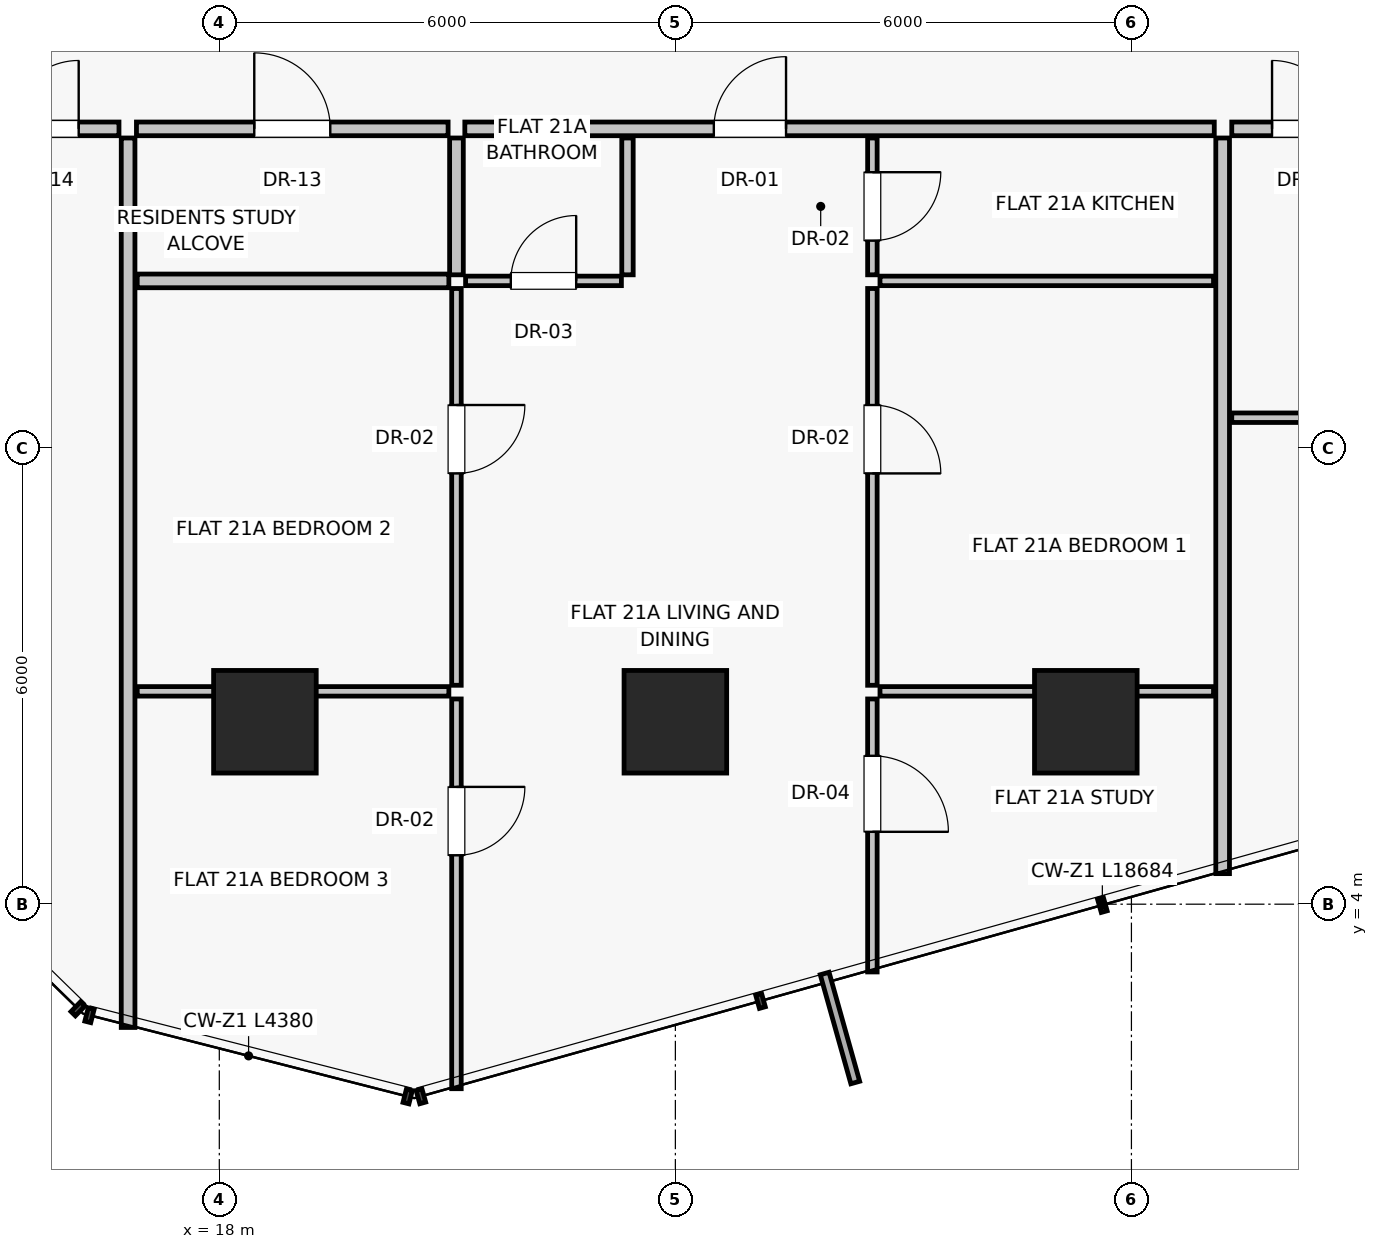
"""IFC4 building model, lengths in metres.
Left out: names, types, materials, properties, quantities, classifications, styles, units other than length and angle.
Written with IfcOpenShell. Run it as: python <this file> out.ifc"""

import sys

from ifc_helpers import new_model, si_unit, direction, frame, frame_2d, origin, origin_2d, place, context, subcontext, project, spatial, rectangle, extrude, source, transform, mapped, element, fill, save


model = new_model("IFC4")
c1 = context("Model", 3, precision=1e-05, world=origin(), true_north=direction((0.0, 1.0)))
c2 = subcontext(c1, "Body", "Model", "MODEL_VIEW")
j1 = project(units=[si_unit("LENGTHUNIT", "METRE"), si_unit("PLANEANGLEUNIT", "RADIAN")], contexts=[c1])
p1 = place(None, origin())
s1 = spatial("IfcSite", under=j1, at=p1, CompositionType="ELEMENT")
p2 = place(p1, origin())
s2 = spatial("IfcBuilding", under=s1, at=p2, CompositionType="ELEMENT")
p3 = place(p2, frame((0.0, 0.0, 77.1)))
s3 = spatial("IfcBuildingStorey", under=s2, at=p3, CompositionType="ELEMENT", Elevation=77.1)
for number, where, z_axis, x_axis in (
    (1, (18.6, 6.4, 0.0), (0.0, 0.0, 1.0), (1.0, 0.0, 0.0)),
    (2, (24.0, 6.4, 0.0), (0.0, 0.0, 1.0), (1.0, 0.0, 0.0)),
    (3, (29.4, 6.4, 0.0), (0.0, 0.0, 1.0), (1.0, 0.0, 0.0)),
):
    element("IfcColumn", number, at=place(p3, frame(where, z_axis=z_axis, x_axis=x_axis)), inside=s3, PredefinedType="COLUMN", context=c2, shape_type="SweptSolid", body=[
        extrude(rectangle(XDim=1.35, YDim=1.35, at=origin_2d()), origin(), (0.0, 0.0, 1.0), 3.25),
    ])
p4 = place(p3, frame((16.8, 14.08, 0.0), z_axis=(0.0, 0.0, 1.0), x_axis=(0.0, -1.0, 0.0)))
e4 = element("IfcWall", 4, at=p4, inside=s3, PredefinedType="PARTITIONING", context=c2, shape_type="SweptSolid", body=[
    extrude(rectangle(XDim=11.702, YDim=0.18, at=frame_2d((5.851, 0.0))), origin(), (0.0, 0.0, 1.0), 2.93),
])
p5 = place(p3, frame((31.2, 14.08, 0.0), z_axis=(0.0, 0.0, 1.0), x_axis=(0.0, -1.0, 0.0)))
e5 = element("IfcWall", 5, at=p5, inside=s3, PredefinedType="PARTITIONING", context=c2, shape_type="SweptSolid", body=[
    extrude(rectangle(XDim=9.678, YDim=0.18, at=frame_2d((4.839, 0.0))), origin(), (0.0, 0.0, 1.0), 2.93),
])
p6 = place(p3, frame((16.91, 14.2, 0.0), z_axis=(0.0, 0.0, 1.0), x_axis=(1.0, 0.0, 0.0)))
e6 = element("IfcWall", 6, at=p6, inside=s3, PredefinedType="PARTITIONING", context=c2, shape_type="SweptSolid", body=[
    extrude(rectangle(XDim=4.1, YDim=0.18, at=frame_2d((2.05, 0.0))), origin(), (0.0, 0.0, 1.0), 2.93),
])
p7 = place(p6, frame((1.55, 0.0, 0.0)))
e7 = element("IfcOpeningElement", 7, at=p7, cuts=e6, PredefinedType="OPENING", context=c2, shape_type="SweptSolid", body=[
    extrude(rectangle(XDim=1.0, YDim=2.01, at=frame_2d((0.5, 1.005))), frame((0.0, 0.1, 0.0), z_axis=(0.0, -1.0, 0.0), x_axis=(1.0, 0.0, 0.0)), (0.0, 0.0, 1.0), 0.2),
])
p8 = place(p3, frame((21.23, 14.2, 0.0), z_axis=(0.0, 0.0, 1.0), x_axis=(1.0, 0.0, 0.0)))
e8 = element("IfcWall", 8, at=p8, inside=s3, PredefinedType="PARTITIONING", context=c2, shape_type="SweptSolid", body=[
    extrude(rectangle(XDim=9.86, YDim=0.18, at=frame_2d((4.93, 0.0))), origin(), (0.0, 0.0, 1.0), 2.93),
])
p9 = place(p8, frame((3.276, 0.0, 0.0)))
e9 = element("IfcOpeningElement", 9, at=p9, cuts=e8, PredefinedType="OPENING", context=c2, shape_type="SweptSolid", body=[
    extrude(rectangle(XDim=0.95, YDim=2.02, at=frame_2d((0.475, 1.01))), frame((0.0, 0.1, 0.0), z_axis=(0.0, -1.0, 0.0), x_axis=(1.0, 0.0, 0.0)), (0.0, 0.0, 1.0), 0.2),
])
p10 = place(p3, frame((16.92, 6.8, 0.0), z_axis=(0.0, 0.0, 1.0), x_axis=(1.0, 0.0, 0.0)))
e10 = element("IfcWall", 10, at=p10, inside=s3, PredefinedType="PARTITIONING", context=c2, shape_type="SweptSolid", body=[
    extrude(rectangle(XDim=4.1, YDim=0.125, at=frame_2d((2.05, 0.0))), origin(), (0.0, 0.0, 1.0), 2.08),
])
p11 = place(p3, frame((21.12, 6.7, 0.0), z_axis=(0.0, 0.0, 1.0), x_axis=(0.0, -1.0, 0.0)))
e11 = element("IfcWall", 11, at=p11, inside=s3, PredefinedType="PARTITIONING", context=c2, shape_type="SweptSolid", body=[
    extrude(rectangle(XDim=5.127, YDim=0.125, at=frame_2d((2.564, 0.0))), origin(), (0.0, 0.0, 1.0), 2.93),
])
p12 = place(p11, frame((1.157, 0.0, 0.0)))
e12 = element("IfcOpeningElement", 12, at=p12, cuts=e11, PredefinedType="OPENING", context=c2, shape_type="SweptSolid", body=[
    extrude(rectangle(XDim=0.9, YDim=2.01, at=frame_2d((0.45, 1.005))), frame((0.0, 0.073, 0.0), z_axis=(0.0, -1.0, 0.0), x_axis=(1.0, 0.0, 0.0)), (0.0, 0.0, 1.0), 0.145),
])
p13 = place(p3, frame((26.692, 6.8, 0.0), z_axis=(0.0, 0.0, 1.0), x_axis=(1.0, 0.0, 0.0)))
e13 = element("IfcWall", 13, at=p13, inside=s3, PredefinedType="PARTITIONING", context=c2, shape_type="SweptSolid", body=[
    extrude(rectangle(XDim=4.388, YDim=0.125, at=frame_2d((2.194, 0.0))), origin(), (0.0, 0.0, 1.0), 2.08),
])
p14 = place(p3, frame((26.592, 6.7, 0.0), z_axis=(0.0, 0.0, 1.0), x_axis=(0.0, -1.0, 0.0)))
e14 = element("IfcWall", 14, at=p14, inside=s3, PredefinedType="PARTITIONING", context=c2, shape_type="SweptSolid", body=[
    extrude(rectangle(XDim=3.592, YDim=0.125, at=frame_2d((1.796, 0.0))), origin(), (0.0, 0.0, 1.0), 2.93),
])
p15 = place(p14, frame((0.748, 0.0, 0.0)))
e15 = element("IfcOpeningElement", 15, at=p15, cuts=e14, PredefinedType="OPENING", context=c2, shape_type="SweptSolid", body=[
    extrude(rectangle(XDim=1.0, YDim=2.01, at=frame_2d((0.5, 1.005))), frame((0.0, 0.073, 0.0), z_axis=(0.0, -1.0, 0.0), x_axis=(1.0, 0.0, 0.0)), (0.0, 0.0, 1.0), 0.145),
])
p16 = place(p3, frame((16.92, 12.2, 0.0), z_axis=(0.0, 0.0, 1.0), x_axis=(1.0, 0.0, 0.0)))
e16 = element("IfcWall", 16, at=p16, inside=s3, PredefinedType="PARTITIONING", context=c2, shape_type="SweptSolid", body=[
    extrude(rectangle(XDim=4.1, YDim=0.18, at=frame_2d((2.05, 0.0))), origin(), (0.0, 0.0, 1.0), 2.93),
])
p17 = place(p3, frame((21.12, 14.08, 0.0), z_axis=(0.0, 0.0, 1.0), x_axis=(0.0, -1.0, 0.0)))
e17 = element("IfcWall", 17, at=p17, inside=s3, PredefinedType="PARTITIONING", context=c2, shape_type="SweptSolid", body=[
    extrude(rectangle(XDim=1.8, YDim=0.18, at=frame_2d((0.9, 0.0))), origin(), (0.0, 0.0, 1.0), 2.93),
])
p18 = place(p3, frame((21.12, 12.1, 0.0), z_axis=(0.0, 0.0, 1.0), x_axis=(0.0, -1.0, 0.0)))
e18 = element("IfcWall", 18, at=p18, inside=s3, PredefinedType="PARTITIONING", context=c2, shape_type="SweptSolid", body=[
    extrude(rectangle(XDim=5.22, YDim=0.125, at=frame_2d((2.61, 0.0))), origin(), (0.0, 0.0, 1.0), 2.93),
])
p19 = place(p18, frame((1.533, 0.0, 0.0)))
e19 = element("IfcOpeningElement", 19, at=p19, cuts=e18, PredefinedType="OPENING", context=c2, shape_type="SweptSolid", body=[
    extrude(rectangle(XDim=0.9, YDim=2.01, at=frame_2d((0.45, 1.005))), frame((0.0, 0.073, 0.0), z_axis=(0.0, -1.0, 0.0), x_axis=(1.0, 0.0, 0.0)), (0.0, 0.0, 1.0), 0.145),
])
p20 = place(p3, frame((23.37, 14.08, 0.0), z_axis=(0.0, 0.0, 1.0), x_axis=(0.0, -1.0, 0.0)))
e20 = element("IfcWall", 20, at=p20, inside=s3, PredefinedType="PARTITIONING", context=c2, shape_type="SweptSolid", body=[
    extrude(rectangle(XDim=1.8, YDim=0.15, at=frame_2d((0.9, 0.0))), origin(), (0.0, 0.0, 1.0), 2.93),
])
p21 = place(p3, frame((21.24, 12.2, 0.0), z_axis=(0.0, 0.0, 1.0), x_axis=(1.0, 0.0, 0.0)))
e21 = element("IfcWall", 21, at=p21, inside=s3, PredefinedType="PARTITIONING", context=c2, shape_type="SweptSolid", body=[
    extrude(rectangle(XDim=2.05, YDim=0.125, at=frame_2d((1.025, 0.0))), origin(), (0.0, 0.0, 1.0), 2.93),
])
p22 = place(p21, frame((0.595, 0.0, 0.0)))
e22 = element("IfcOpeningElement", 22, at=p22, cuts=e21, PredefinedType="OPENING", context=c2, shape_type="SweptSolid", body=[
    extrude(rectangle(XDim=0.86, YDim=2.01, at=frame_2d((0.43, 1.005))), frame((0.0, 0.073, 0.0), z_axis=(0.0, -1.0, 0.0), x_axis=(1.0, 0.0, 0.0)), (0.0, 0.0, 1.0), 0.145),
])
p23 = place(p3, frame((26.592, 14.08, 0.0), z_axis=(0.0, 0.0, 1.0), x_axis=(0.0, -1.0, 0.0)))
e23 = element("IfcWall", 23, at=p23, inside=s3, PredefinedType="PARTITIONING", context=c2, shape_type="SweptSolid", body=[
    extrude(rectangle(XDim=1.8, YDim=0.125, at=frame_2d((0.9, 0.0))), origin(), (0.0, 0.0, 1.0), 2.93),
])
p24 = place(p23, frame((0.45, 0.0, 0.0)))
e24 = element("IfcOpeningElement", 24, at=p24, cuts=e23, PredefinedType="OPENING", context=c2, shape_type="SweptSolid", body=[
    extrude(rectangle(XDim=0.9, YDim=2.01, at=frame_2d((0.45, 1.005))), frame((0.0, 0.073, 0.0), z_axis=(0.0, -1.0, 0.0), x_axis=(1.0, 0.0, 0.0)), (0.0, 0.0, 1.0), 0.145),
])
p25 = place(p3, frame((26.692, 12.2, 0.0), z_axis=(0.0, 0.0, 1.0), x_axis=(1.0, 0.0, 0.0)))
e25 = element("IfcWall", 25, at=p25, inside=s3, PredefinedType="PARTITIONING", context=c2, shape_type="SweptSolid", body=[
    extrude(rectangle(XDim=4.388, YDim=0.125, at=frame_2d((2.194, 0.0))), origin(), (0.0, 0.0, 1.0), 2.93),
])
p26 = place(p3, frame((26.592, 12.1, 0.0), z_axis=(0.0, 0.0, 1.0), x_axis=(0.0, -1.0, 0.0)))
e26 = element("IfcWall", 26, at=p26, inside=s3, PredefinedType="PARTITIONING", context=c2, shape_type="SweptSolid", body=[
    extrude(rectangle(XDim=5.22, YDim=0.125, at=frame_2d((2.61, 0.0))), origin(), (0.0, 0.0, 1.0), 2.93),
])
p27 = place(p26, frame((1.533, 0.0, 0.0)))
e27 = element("IfcOpeningElement", 27, at=p27, cuts=e26, PredefinedType="OPENING", context=c2, shape_type="SweptSolid", body=[
    extrude(rectangle(XDim=0.9, YDim=2.01, at=frame_2d((0.45, 1.005))), frame((0.0, 0.073, 0.0), z_axis=(0.0, -1.0, 0.0), x_axis=(1.0, 0.0, 0.0)), (0.0, 0.0, 1.0), 0.145),
])
p28 = place(p3, frame((14.72, 14.2, 0.0), z_axis=(0.0, 0.0, 1.0), x_axis=(1.0, 0.0, 0.0)))
e28 = element("IfcWall", 28, at=p28, inside=s3, PredefinedType="PARTITIONING", context=c2, shape_type="SweptSolid", body=[
    extrude(rectangle(XDim=1.96, YDim=0.18, at=frame_2d((0.98, 0.0))), origin(), (0.0, 0.0, 1.0), 2.93),
])
p29 = place(p28, frame((0.53, 0.0, 0.0)))
e29 = element("IfcOpeningElement", 29, at=p29, cuts=e28, PredefinedType="OPENING", context=c2, shape_type="SweptSolid", body=[
    extrude(rectangle(XDim=0.9, YDim=2.01, at=frame_2d((0.45, 1.005))), frame((0.0, 0.1, 0.0), z_axis=(0.0, -1.0, 0.0), x_axis=(1.0, 0.0, 0.0)), (0.0, 0.0, 1.0), 0.2),
])
p30 = place(p3, frame((31.32, 14.2, 0.0), z_axis=(0.0, 0.0, 1.0), x_axis=(1.0, 0.0, 0.0)))
e30 = element("IfcWall", 30, at=p30, inside=s3, PredefinedType="PARTITIONING", context=c2, shape_type="SweptSolid", body=[
    extrude(rectangle(XDim=1.96, YDim=0.18, at=frame_2d((0.98, 0.0))), origin(), (0.0, 0.0, 1.0), 2.93),
])
p31 = place(p30, frame((0.53, 0.0, 0.0)))
e31 = element("IfcOpeningElement", 31, at=p31, cuts=e30, PredefinedType="OPENING", context=c2, shape_type="SweptSolid", body=[
    extrude(rectangle(XDim=0.9, YDim=2.01, at=frame_2d((0.45, 1.005))), frame((0.0, 0.1, 0.0), z_axis=(0.0, -1.0, 0.0), x_axis=(1.0, 0.0, 0.0)), (0.0, 0.0, 1.0), 0.2),
])
p32 = place(p3, frame((31.32, 10.4, 0.0), z_axis=(0.0, 0.0, 1.0), x_axis=(1.0, 0.0, 0.0)))
e32 = element("IfcWall", 32, at=p32, inside=s3, PredefinedType="PARTITIONING", context=c2, shape_type="SweptSolid", body=[
    extrude(rectangle(XDim=10.69, YDim=0.125, at=frame_2d((5.345, 0.0))), origin(), (0.0, 0.0, 1.0), 2.93),
])
p33 = place(p32, frame((4.915, 0.0, 0.0)))
e33 = element("IfcOpeningElement", 33, at=p33, cuts=e32, PredefinedType="OPENING", context=c2, shape_type="SweptSolid", body=[
    extrude(rectangle(XDim=0.86, YDim=2.01, at=frame_2d((0.43, 1.005))), frame((0.0, 0.073, 0.0), z_axis=(0.0, -1.0, 0.0), x_axis=(1.0, 0.0, 0.0)), (0.0, 0.0, 1.0), 0.145),
])
m1 = source(origin(), c2, "Body", "SweptSolid", [
    extrude(rectangle(XDim=1.0, YDim=2.01, at=frame_2d((0.5, 1.005))), frame((0.0, 0.025, 0.0), z_axis=(0.0, -1.0, 0.0), x_axis=(1.0, 0.0, 0.0)), (0.0, 0.0, 1.0), 0.05),
])
p34 = place(p7, origin())
e34 = element("IfcDoor", 34, at=p34, inside=s3, OperationType="SINGLE_SWING_LEFT", PredefinedType="DOOR", context=c2, shape_type="MappedRepresentation", body=[
    mapped(m1, transform((0.0, 0.0, 0.0), scale=1.0)),
])
fill(e7, e34)
m2 = source(origin(), c2, "Body", "SweptSolid", [
    extrude(rectangle(XDim=0.95, YDim=2.02, at=frame_2d((0.475, 1.01))), frame((0.0, 0.025, 0.0), z_axis=(0.0, -1.0, 0.0), x_axis=(1.0, 0.0, 0.0)), (0.0, 0.0, 1.0), 0.05),
])
p35 = place(p9, origin())
e35 = element("IfcDoor", 35, at=p35, inside=s3, OperationType="SINGLE_SWING_RIGHT", PredefinedType="DOOR", context=c2, shape_type="MappedRepresentation", body=[
    mapped(m2, transform((0.0, 0.0, 0.0), scale=1.0)),
])
fill(e9, e35)
m3 = source(origin(), c2, "Body", "SweptSolid", [
    extrude(rectangle(XDim=0.9, YDim=2.01, at=frame_2d((0.45, 1.005))), frame((0.0, 0.025, 0.0), z_axis=(0.0, -1.0, 0.0), x_axis=(1.0, 0.0, 0.0)), (0.0, 0.0, 1.0), 0.05),
])
p36 = place(p12, origin())
e36 = element("IfcDoor", 36, at=p36, inside=s3, OperationType="SINGLE_SWING_LEFT", PredefinedType="DOOR", context=c2, shape_type="MappedRepresentation", body=[
    mapped(m3, transform((0.0, 0.0, 0.0), scale=1.0)),
])
fill(e12, e36)
p37 = place(p15, origin())
e37 = element("IfcDoor", 37, at=p37, inside=s3, OperationType="SINGLE_SWING_RIGHT", PredefinedType="DOOR", context=c2, shape_type="MappedRepresentation", body=[
    mapped(m1, transform((0.0, 0.0, 0.0), scale=1.0)),
])
fill(e15, e37)
p38 = place(p19, origin())
e38 = element("IfcDoor", 38, at=p38, inside=s3, OperationType="SINGLE_SWING_LEFT", PredefinedType="DOOR", context=c2, shape_type="MappedRepresentation", body=[
    mapped(m3, transform((0.0, 0.0, 0.0), scale=1.0)),
])
fill(e19, e38)
m4 = source(origin(), c2, "Body", "SweptSolid", [
    extrude(rectangle(XDim=0.86, YDim=2.01, at=frame_2d((0.43, 1.005))), frame((0.0, 0.025, 0.0), z_axis=(0.0, -1.0, 0.0), x_axis=(1.0, 0.0, 0.0)), (0.0, 0.0, 1.0), 0.05),
])
p39 = place(p22, origin())
e39 = element("IfcDoor", 39, at=p39, inside=s3, OperationType="SINGLE_SWING_RIGHT", PredefinedType="DOOR", context=c2, shape_type="MappedRepresentation", body=[
    mapped(m4, transform((0.0, 0.0, 0.0), scale=1.0)),
])
fill(e22, e39)
p40 = place(p24, origin())
e40 = element("IfcDoor", 40, at=p40, inside=s3, OperationType="SINGLE_SWING_LEFT", PredefinedType="DOOR", context=c2, shape_type="MappedRepresentation", body=[
    mapped(m3, transform((0.0, 0.0, 0.0), scale=1.0)),
])
fill(e24, e40)
p41 = place(p27, origin())
e41 = element("IfcDoor", 41, at=p41, inside=s3, OperationType="SINGLE_SWING_RIGHT", PredefinedType="DOOR", context=c2, shape_type="MappedRepresentation", body=[
    mapped(m3, transform((0.0, 0.0, 0.0), scale=1.0)),
])
fill(e27, e41)
p42 = place(p29, origin())
e42 = element("IfcDoor", 42, at=p42, inside=s3, OperationType="SINGLE_SWING_RIGHT", PredefinedType="DOOR", context=c2, shape_type="MappedRepresentation", body=[
    mapped(m3, transform((0.0, 0.0, 0.0), scale=1.0)),
])
fill(e29, e42)
p43 = place(p31, origin())
e43 = element("IfcDoor", 43, at=p43, inside=s3, OperationType="SINGLE_SWING_LEFT", PredefinedType="DOOR", context=c2, shape_type="MappedRepresentation", body=[
    mapped(m3, transform((0.0, 0.0, 0.0), scale=1.0)),
])
fill(e31, e43)
save(model, sys.argv[1])
